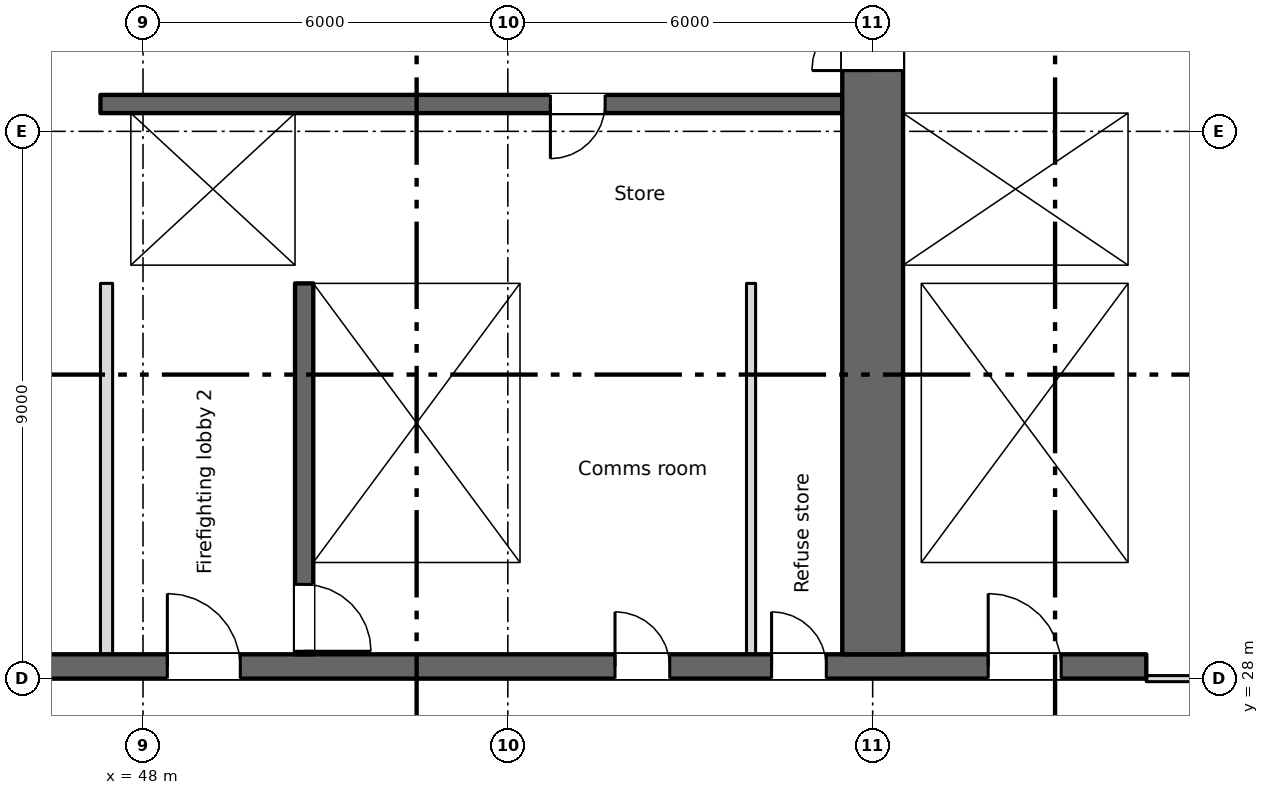
"""IFC4 building model, lengths in metres.
Left out: names, types, materials, properties, quantities, classifications, styles, units other than length and angle.
Written with IfcOpenShell. Run it as: python <this file> out.ifc"""

import sys

from ifc_helpers import new_model, si_unit, direction, frame, frame_2d, origin, place, context, subcontext, project, spatial, rectangle, extrude, element, fill, save


model = new_model("IFC4")
c1 = context("Model", 3, precision=1e-05, world=origin(), true_north=direction((0.0, 1.0)))
c2 = subcontext(c1, "Body", "Model", "MODEL_VIEW")
j1 = project(units=[si_unit("LENGTHUNIT", "METRE"), si_unit("PLANEANGLEUNIT", "RADIAN")], contexts=[c1])
p1 = place(None, origin())
s1 = spatial("IfcSite", under=j1, at=p1, CompositionType="ELEMENT")
p2 = place(p1, origin())
s2 = spatial("IfcBuilding", under=s1, at=p2, CompositionType="ELEMENT")
p3 = place(p2, frame((0.0, 0.0, 30.0)))
s3 = spatial("IfcBuildingStorey", under=s2, at=p3, CompositionType="ELEMENT", Elevation=30.0)
p4 = place(p3, frame((6.7, 28.2, 0.0), z_axis=(0.0, 0.0, 1.0), x_axis=(1.0, 0.0, 0.0)))
e1 = element("IfcWall", 1, at=p4, inside=s3, PredefinedType="SHEAR", context=c2, shape_type="SweptSolid", body=[
    extrude(rectangle(XDim=57.8, YDim=0.4, at=frame_2d((28.9, 0.0))), origin(), (0.0, 0.0, 1.0), 3.35),
])
p5 = place(p4, frame((12.062, 0.0, 0.0)))
e2 = element("IfcOpeningElement", 2, at=p5, cuts=e1, PredefinedType="OPENING", context=c2, shape_type="SweptSolid", body=[
    extrude(rectangle(XDim=0.9, YDim=2.1, at=frame_2d((0.45, 1.05))), frame((0.0, 0.21, 0.0), z_axis=(0.0, -1.0, 0.0), x_axis=(1.0, 0.0, 0.0)), (0.0, 0.0, 1.0), 0.42),
])
p6 = place(p4, frame((14.637, 0.0, 0.0)))
e3 = element("IfcOpeningElement", 3, at=p6, cuts=e1, PredefinedType="OPENING", context=c2, shape_type="SweptSolid", body=[
    extrude(rectangle(XDim=0.9, YDim=2.1, at=frame_2d((0.45, 1.05))), frame((0.0, 0.21, 0.0), z_axis=(0.0, -1.0, 0.0), x_axis=(1.0, 0.0, 0.0)), (0.0, 0.0, 1.0), 0.42),
])
p7 = place(p4, frame((49.062, 0.0, 0.0)))
e4 = element("IfcOpeningElement", 4, at=p7, cuts=e1, PredefinedType="OPENING", context=c2, shape_type="SweptSolid", body=[
    extrude(rectangle(XDim=0.9, YDim=2.1, at=frame_2d((0.45, 1.05))), frame((0.0, 0.21, 0.0), z_axis=(0.0, -1.0, 0.0), x_axis=(1.0, 0.0, 0.0)), (0.0, 0.0, 1.0), 0.42),
])
p8 = place(p4, frame((51.637, 0.0, 0.0)))
e5 = element("IfcOpeningElement", 5, at=p8, cuts=e1, PredefinedType="OPENING", context=c2, shape_type="SweptSolid", body=[
    extrude(rectangle(XDim=0.9, YDim=2.1, at=frame_2d((0.45, 1.05))), frame((0.0, 0.21, 0.0), z_axis=(0.0, -1.0, 0.0), x_axis=(1.0, 0.0, 0.0)), (0.0, 0.0, 1.0), 0.42),
])
p9 = place(p4, frame((1.35, 0.0, 0.0)))
e6 = element("IfcOpeningElement", 6, at=p9, cuts=e1, PredefinedType="OPENING", context=c2, shape_type="SweptSolid", body=[
    extrude(rectangle(XDim=0.9, YDim=2.1, at=frame_2d((0.45, 1.05))), frame((0.0, 0.21, 0.0), z_axis=(0.0, -1.0, 0.0), x_axis=(1.0, 0.0, 0.0)), (0.0, 0.0, 1.0), 0.42),
])
p10 = place(p4, frame((4.7, 0.0, 0.0)))
e7 = element("IfcOpeningElement", 7, at=p10, cuts=e1, PredefinedType="OPENING", context=c2, shape_type="SweptSolid", body=[
    extrude(rectangle(XDim=1.2, YDim=2.1, at=frame_2d((0.6, 1.05))), frame((0.0, 0.21, 0.0), z_axis=(0.0, -1.0, 0.0), x_axis=(1.0, 0.0, 0.0)), (0.0, 0.0, 1.0), 0.42),
])
p11 = place(p4, frame((31.7, 0.0, 0.0)))
e8 = element("IfcOpeningElement", 8, at=p11, cuts=e1, PredefinedType="OPENING", context=c2, shape_type="SweptSolid", body=[
    extrude(rectangle(XDim=1.2, YDim=2.1, at=frame_2d((0.6, 1.05))), frame((0.0, 0.21, 0.0), z_axis=(0.0, -1.0, 0.0), x_axis=(1.0, 0.0, 0.0)), (0.0, 0.0, 1.0), 0.42),
])
p12 = place(p4, frame((55.2, 0.0, 0.0)))
e9 = element("IfcOpeningElement", 9, at=p12, cuts=e1, PredefinedType="OPENING", context=c2, shape_type="SweptSolid", body=[
    extrude(rectangle(XDim=1.2, YDim=2.1, at=frame_2d((0.6, 1.05))), frame((0.0, 0.21, 0.0), z_axis=(0.0, -1.0, 0.0), x_axis=(1.0, 0.0, 0.0)), (0.0, 0.0, 1.0), 0.42),
])
p13 = place(p4, frame((21.7, 0.0, 0.0)))
e10 = element("IfcOpeningElement", 10, at=p13, cuts=e1, PredefinedType="OPENING", context=c2, shape_type="SweptSolid", body=[
    extrude(rectangle(XDim=1.2, YDim=2.1, at=frame_2d((0.6, 1.05))), frame((0.0, 0.21, 0.0), z_axis=(0.0, -1.0, 0.0), x_axis=(1.0, 0.0, 0.0)), (0.0, 0.0, 1.0), 0.42),
])
p14 = place(p4, frame((41.7, 0.0, 0.0)))
e11 = element("IfcOpeningElement", 11, at=p14, cuts=e1, PredefinedType="OPENING", context=c2, shape_type="SweptSolid", body=[
    extrude(rectangle(XDim=1.2, YDim=2.1, at=frame_2d((0.6, 1.05))), frame((0.0, 0.21, 0.0), z_axis=(0.0, -1.0, 0.0), x_axis=(1.0, 0.0, 0.0)), (0.0, 0.0, 1.0), 0.42),
])
p15 = place(p4, frame((24.85, 0.0, 0.0)))
e12 = element("IfcOpeningElement", 12, at=p15, cuts=e1, PredefinedType="OPENING", context=c2, shape_type="SweptSolid", body=[
    extrude(rectangle(XDim=2.4, YDim=2.1, at=frame_2d((1.2, 1.05))), frame((0.0, 0.21, 0.0), z_axis=(0.0, -1.0, 0.0), x_axis=(1.0, 0.0, 0.0)), (0.0, 0.0, 1.0), 0.42),
])
p16 = place(p4, frame((37.35, 0.0, 0.0)))
e13 = element("IfcOpeningElement", 13, at=p16, cuts=e1, PredefinedType="OPENING", context=c2, shape_type="SweptSolid", body=[
    extrude(rectangle(XDim=2.4, YDim=2.1, at=frame_2d((1.2, 1.05))), frame((0.0, 0.21, 0.0), z_axis=(0.0, -1.0, 0.0), x_axis=(1.0, 0.0, 0.0)), (0.0, 0.0, 1.0), 0.42),
])
p17 = place(p4, frame((7.85, 0.0, 0.0)))
e14 = element("IfcOpeningElement", 14, at=p17, cuts=e1, PredefinedType="OPENING", context=c2, shape_type="SweptSolid", body=[
    extrude(rectangle(XDim=2.4, YDim=2.1, at=frame_2d((1.2, 1.05))), frame((0.0, 0.21, 0.0), z_axis=(0.0, -1.0, 0.0), x_axis=(1.0, 0.0, 0.0)), (0.0, 0.0, 1.0), 0.42),
])
p18 = place(p4, frame((28.85, 0.0, 0.0)))
e15 = element("IfcOpeningElement", 15, at=p18, cuts=e1, PredefinedType="OPENING", context=c2, shape_type="SweptSolid", body=[
    extrude(rectangle(XDim=0.9, YDim=2.1, at=frame_2d((0.45, 1.05))), frame((0.0, 0.21, 0.0), z_axis=(0.0, -1.0, 0.0), x_axis=(1.0, 0.0, 0.0)), (0.0, 0.0, 1.0), 0.42),
])
p19 = place(p4, frame((34.85, 0.0, 0.0)))
e16 = element("IfcOpeningElement", 16, at=p19, cuts=e1, PredefinedType="OPENING", context=c2, shape_type="SweptSolid", body=[
    extrude(rectangle(XDim=0.9, YDim=2.1, at=frame_2d((0.45, 1.05))), frame((0.0, 0.21, 0.0), z_axis=(0.0, -1.0, 0.0), x_axis=(1.0, 0.0, 0.0)), (0.0, 0.0, 1.0), 0.42),
])
p20 = place(p3, frame((64.35, 34.8, 0.0), z_axis=(0.0, 0.0, 1.0), x_axis=(0.0, 1.0, 0.0)))
e17 = element("IfcWall", 17, at=p20, inside=s3, PredefinedType="SHEAR", context=c2, shape_type="SweptSolid", body=[
    extrude(rectangle(XDim=10.2, YDim=0.3, at=frame_2d((5.1, 0.0))), origin(), (0.0, 0.0, 1.0), 3.35),
])
p21 = place(p3, frame((60.0, 28.4, 0.0), z_axis=(0.0, 0.0, 1.0), x_axis=(0.0, 1.0, 0.0)))
e18 = element("IfcWall", 18, at=p21, inside=s3, PredefinedType="SHEAR", context=c2, shape_type="SweptSolid", body=[
    extrude(rectangle(XDim=16.6, YDim=1.0, at=frame_2d((8.3, 0.0))), origin(), (0.0, 0.0, 1.0), 3.35),
])
p22 = place(p21, frame((9.6, 0.0, 0.0)))
e19 = element("IfcOpeningElement", 19, at=p22, cuts=e18, PredefinedType="OPENING", context=c2, shape_type="SweptSolid", body=[
    extrude(rectangle(XDim=2.0, YDim=2.1, at=frame_2d((1.0, 1.05))), frame((0.0, 0.51, 0.0), z_axis=(0.0, -1.0, 0.0), x_axis=(1.0, 0.0, 0.0)), (0.0, 0.0, 1.0), 1.02),
])
p23 = place(p21, frame((15.25, 0.0, 0.0)))
e20 = element("IfcOpeningElement", 20, at=p23, cuts=e18, PredefinedType="OPENING", context=c2, shape_type="SweptSolid", body=[
    extrude(rectangle(XDim=1.2, YDim=2.1, at=frame_2d((0.6, 1.05))), frame((0.0, 0.51, 0.0), z_axis=(0.0, -1.0, 0.0), x_axis=(1.0, 0.0, 0.0)), (0.0, 0.0, 1.0), 1.02),
])
p24 = place(p3, frame((50.65, 34.5, 0.0), z_axis=(0.0, 0.0, 1.0), x_axis=(0.0, -1.0, 0.0)))
e21 = element("IfcWall", 21, at=p24, inside=s3, PredefinedType="SHEAR", context=c2, shape_type="SweptSolid", body=[
    extrude(rectangle(XDim=6.1, YDim=0.3, at=frame_2d((3.05, 0.0))), origin(), (0.0, 0.0, 1.0), 3.35),
])
p25 = place(p24, frame((4.95, 0.0, 0.0)))
e22 = element("IfcOpeningElement", 22, at=p25, cuts=e21, PredefinedType="OPENING", context=c2, shape_type="SweptSolid", body=[
    extrude(rectangle(XDim=1.1, YDim=2.1, at=frame_2d((0.55, 1.05))), frame((0.0, 0.16, 0.0), z_axis=(0.0, -1.0, 0.0), x_axis=(1.0, 0.0, 0.0)), (0.0, 0.0, 1.0), 0.32),
])
for number, where, z_axis, x_axis in (
    (23, (54.35, 28.4, 0.0), (0.0, 0.0, 1.0), (0.0, 1.0, 0.0)),
    (24, (60.65, 28.4, 0.0), (0.0, 0.0, 1.0), (0.0, 1.0, 0.0)),
    (25, (64.35, 28.4, 0.0), (0.0, 0.0, 1.0), (0.0, 1.0, 0.0)),
):
    element("IfcWall", number, at=place(p3, frame(where, z_axis=z_axis, x_axis=x_axis)), inside=s3, PredefinedType="SHEAR", context=c2, shape_type="SweptSolid", body=[
        extrude(rectangle(XDim=6.1, YDim=0.3, at=frame_2d((3.05, 0.0))), origin(), (0.0, 0.0, 1.0), 3.35),
    ])
p26 = place(p3, frame((47.3, 34.65, 0.0), z_axis=(0.0, 0.0, 1.0), x_axis=(1.0, 0.0, 0.0)))
e26 = element("IfcWall", 26, at=p26, inside=s3, PredefinedType="SHEAR", context=c2, shape_type="SweptSolid", body=[
    extrude(rectangle(XDim=12.2, YDim=0.3, at=frame_2d((6.1, 0.0))), origin(), (0.0, 0.0, 1.0), 3.35),
])
p27 = place(p26, frame((1.3, 0.0, 0.0)))
e27 = element("IfcOpeningElement", 27, at=p27, cuts=e26, PredefinedType="OPENING", context=c2, shape_type="SweptSolid", body=[
    extrude(rectangle(XDim=1.1, YDim=2.1, at=frame_2d((0.55, 1.05))), frame((0.0, 0.16, 0.0), z_axis=(0.0, -1.0, 0.0), x_axis=(1.0, 0.0, 0.0)), (0.0, 0.0, 1.0), 0.32),
])
p28 = place(p3, frame((60.5, 34.65, 0.0), z_axis=(0.0, 0.0, 1.0), x_axis=(1.0, 0.0, 0.0)))
e28 = element("IfcWall", 28, at=p28, inside=s3, PredefinedType="SHEAR", context=c2, shape_type="SweptSolid", body=[
    extrude(rectangle(XDim=4.0, YDim=0.3, at=frame_2d((2.0, 0.0))), origin(), (0.0, 0.0, 1.0), 3.35),
])
p29 = place(p3, frame((59.5, 37.45, 0.0), z_axis=(0.0, 0.0, 1.0), x_axis=(-1.0, 0.0, 0.0)))
e29 = element("IfcWall", 29, at=p29, inside=s3, PredefinedType="SHEAR", context=c2, shape_type="SweptSolid", body=[
    extrude(rectangle(XDim=12.2, YDim=0.3, at=frame_2d((6.1, 0.0))), origin(), (0.0, 0.0, 1.0), 3.35),
])
p30 = place(p29, frame((3.9, 0.0, 0.0)))
e30 = element("IfcOpeningElement", 30, at=p30, cuts=e29, PredefinedType="OPENING", context=c2, shape_type="SweptSolid", body=[
    extrude(rectangle(XDim=0.9, YDim=2.1, at=frame_2d((0.45, 1.05))), frame((0.0, 0.16, 0.0), z_axis=(0.0, -1.0, 0.0), x_axis=(1.0, 0.0, 0.0)), (0.0, 0.0, 1.0), 0.32),
])
p31 = place(p3, frame((60.5, 37.45, 0.0), z_axis=(0.0, 0.0, 1.0), x_axis=(1.0, 0.0, 0.0)))
e31 = element("IfcWall", 31, at=p31, inside=s3, PredefinedType="SHEAR", context=c2, shape_type="SweptSolid", body=[
    extrude(rectangle(XDim=3.7, YDim=0.3, at=frame_2d((1.85, 0.0))), origin(), (0.0, 0.0, 1.0), 3.35),
])
p32 = place(p31, frame((1.3, 0.0, 0.0)))
e32 = element("IfcOpeningElement", 32, at=p32, cuts=e31, PredefinedType="OPENING", context=c2, shape_type="SweptSolid", body=[
    extrude(rectangle(XDim=1.1, YDim=2.1, at=frame_2d((0.55, 1.05))), frame((0.0, 0.16, 0.0), z_axis=(0.0, -1.0, 0.0), x_axis=(1.0, 0.0, 0.0)), (0.0, 0.0, 1.0), 0.32),
])
p33 = place(p3, frame((47.55, 34.8, 0.0), z_axis=(0.0, 0.0, 1.0), x_axis=(0.0, 1.0, 0.0)))
e33 = element("IfcWall", 33, at=p33, inside=s3, PredefinedType="SHEAR", context=c2, shape_type="SweptSolid", body=[
    extrude(rectangle(XDim=2.5, YDim=0.5, at=frame_2d((1.25, 0.0))), origin(), (0.0, 0.0, 1.0), 3.35),
])
p34 = place(p3, frame((50.65, 34.8, 0.0), z_axis=(0.0, 0.0, 1.0), x_axis=(0.0, 1.0, 0.0)))
e34 = element("IfcWall", 34, at=p34, inside=s3, PredefinedType="SHEAR", context=c2, shape_type="SweptSolid", body=[
    extrude(rectangle(XDim=2.5, YDim=0.3, at=frame_2d((1.25, 0.0))), origin(), (0.0, 0.0, 1.0), 3.35),
])
p35 = place(p3, frame((47.4, 28.4, 0.0), z_axis=(0.0, 0.0, 1.0), x_axis=(0.0, 1.0, 0.0)))
e35 = element("IfcWall", 35, at=p35, inside=s3, PredefinedType="PARTITIONING", context=c2, shape_type="SweptSolid", body=[
    extrude(rectangle(XDim=6.1, YDim=0.2, at=frame_2d((3.05, 0.0))), origin(), (0.0, 0.0, 1.0), 3.35),
])
p36 = place(p3, frame((58.0, 28.4, 0.0), z_axis=(0.0, 0.0, 1.0), x_axis=(0.0, 1.0, 0.0)))
e36 = element("IfcWall", 36, at=p36, inside=s3, PredefinedType="PARTITIONING", context=c2, shape_type="SweptSolid", body=[
    extrude(rectangle(XDim=6.1, YDim=0.15, at=frame_2d((3.05, 0.0))), origin(), (0.0, 0.0, 1.0), 3.35),
])
p37 = place(p3, frame((64.5, 28.0, 0.0), z_axis=(0.0, 0.0, 1.0), x_axis=(1.0, 0.0, 0.0)))
e37 = element("IfcWall", 37, at=p37, inside=s3, PredefinedType="PARTITIONING", context=c2, shape_type="SweptSolid", body=[
    extrude(rectangle(XDim=12.7, YDim=0.1, at=frame_2d((6.35, 0.0))), origin(), (0.0, 0.0, 1.0), 3.35),
])
p38 = place(p37, frame((2.575, 0.0, 0.0)))
e38 = element("IfcOpeningElement", 38, at=p38, cuts=e37, PredefinedType="OPENING", context=c2, shape_type="SweptSolid", body=[
    extrude(rectangle(XDim=1.2, YDim=2.1, at=frame_2d((0.6, 1.05))), frame((0.0, 0.06, 0.0), z_axis=(0.0, -1.0, 0.0), x_axis=(1.0, 0.0, 0.0)), (0.0, 0.0, 1.0), 0.12),
])
p39 = place(p37, frame((8.925, 0.0, 0.0)))
e39 = element("IfcOpeningElement", 39, at=p39, cuts=e37, PredefinedType="OPENING", context=c2, shape_type="SweptSolid", body=[
    extrude(rectangle(XDim=1.2, YDim=2.1, at=frame_2d((0.6, 1.05))), frame((0.0, 0.06, 0.0), z_axis=(0.0, -1.0, 0.0), x_axis=(1.0, 0.0, 0.0)), (0.0, 0.0, 1.0), 0.12),
])
p40 = place(p7, origin())
e40 = element("IfcDoor", 40, at=p40, inside=s3, OperationType="SINGLE_SWING_LEFT", PredefinedType="DOOR", context=c2, shape_type="SweptSolid", body=[
    extrude(rectangle(XDim=0.9, YDim=2.1, at=frame_2d((0.45, 1.05))), frame((0.0, 0.025, 0.0), z_axis=(0.0, -1.0, 0.0), x_axis=(1.0, 0.0, 0.0)), (0.0, 0.0, 1.0), 0.05),
])
fill(e4, e40)
p41 = place(p8, origin())
e41 = element("IfcDoor", 41, at=p41, inside=s3, OperationType="SINGLE_SWING_LEFT", PredefinedType="DOOR", context=c2, shape_type="SweptSolid", body=[
    extrude(rectangle(XDim=0.9, YDim=2.1, at=frame_2d((0.45, 1.05))), frame((0.0, 0.025, 0.0), z_axis=(0.0, -1.0, 0.0), x_axis=(1.0, 0.0, 0.0)), (0.0, 0.0, 1.0), 0.05),
])
fill(e5, e41)
p42 = place(p30, origin())
e42 = element("IfcDoor", 42, at=p42, inside=s3, OperationType="SINGLE_SWING_RIGHT", PredefinedType="DOOR", context=c2, shape_type="SweptSolid", body=[
    extrude(rectangle(XDim=0.9, YDim=2.1, at=frame_2d((0.45, 1.05))), frame((0.0, 0.025, 0.0), z_axis=(0.0, -1.0, 0.0), x_axis=(1.0, 0.0, 0.0)), (0.0, 0.0, 1.0), 0.05),
])
fill(e30, e42)
p43 = place(p32, origin())
e43 = element("IfcDoor", 43, at=p43, inside=s3, OperationType="SLIDING_TO_LEFT", PredefinedType="DOOR", context=c2, shape_type="SweptSolid", body=[
    extrude(rectangle(XDim=1.1, YDim=2.1, at=frame_2d((0.55, 1.05))), frame((0.0, 0.025, 0.0), z_axis=(0.0, -1.0, 0.0), x_axis=(1.0, 0.0, 0.0)), (0.0, 0.0, 1.0), 0.05),
])
fill(e32, e43)
p44 = place(p27, origin())
e44 = element("IfcDoor", 44, at=p44, inside=s3, OperationType="SLIDING_TO_LEFT", PredefinedType="DOOR", context=c2, shape_type="SweptSolid", body=[
    extrude(rectangle(XDim=1.1, YDim=2.1, at=frame_2d((0.55, 1.05))), frame((0.0, 0.025, 0.0), z_axis=(0.0, -1.0, 0.0), x_axis=(1.0, 0.0, 0.0)), (0.0, 0.0, 1.0), 0.05),
])
fill(e27, e44)
p45 = place(p25, origin())
e45 = element("IfcDoor", 45, at=p45, inside=s3, OperationType="SINGLE_SWING_RIGHT", PredefinedType="DOOR", context=c2, shape_type="SweptSolid", body=[
    extrude(rectangle(XDim=1.1, YDim=2.1, at=frame_2d((0.55, 1.05))), frame((0.0, 0.025, 0.0), z_axis=(0.0, -1.0, 0.0), x_axis=(1.0, 0.0, 0.0)), (0.0, 0.0, 1.0), 0.05),
])
fill(e22, e45)
p46 = place(p12, origin())
e46 = element("IfcDoor", 46, at=p46, inside=s3, OperationType="SINGLE_SWING_LEFT", PredefinedType="DOOR", context=c2, shape_type="SweptSolid", body=[
    extrude(rectangle(XDim=1.2, YDim=2.1, at=frame_2d((0.6, 1.05))), frame((0.0, 0.025, 0.0), z_axis=(0.0, -1.0, 0.0), x_axis=(1.0, 0.0, 0.0)), (0.0, 0.0, 1.0), 0.05),
])
fill(e9, e46)
p47 = place(p14, origin())
e47 = element("IfcDoor", 47, at=p47, inside=s3, OperationType="SINGLE_SWING_LEFT", PredefinedType="DOOR", context=c2, shape_type="SweptSolid", body=[
    extrude(rectangle(XDim=1.2, YDim=2.1, at=frame_2d((0.6, 1.05))), frame((0.0, 0.025, 0.0), z_axis=(0.0, -1.0, 0.0), x_axis=(1.0, 0.0, 0.0)), (0.0, 0.0, 1.0), 0.05),
])
fill(e11, e47)
p48 = place(p22, origin())
e48 = element("IfcDoor", 48, at=p48, inside=s3, OperationType="DOUBLE_DOOR_SINGLE_SWING", PredefinedType="DOOR", context=c2, shape_type="SweptSolid", body=[
    extrude(rectangle(XDim=2.0, YDim=2.1, at=frame_2d((1.0, 1.05))), frame((0.0, 0.025, 0.0), z_axis=(0.0, -1.0, 0.0), x_axis=(1.0, 0.0, 0.0)), (0.0, 0.0, 1.0), 0.05),
])
fill(e19, e48)
save(model, sys.argv[1])
